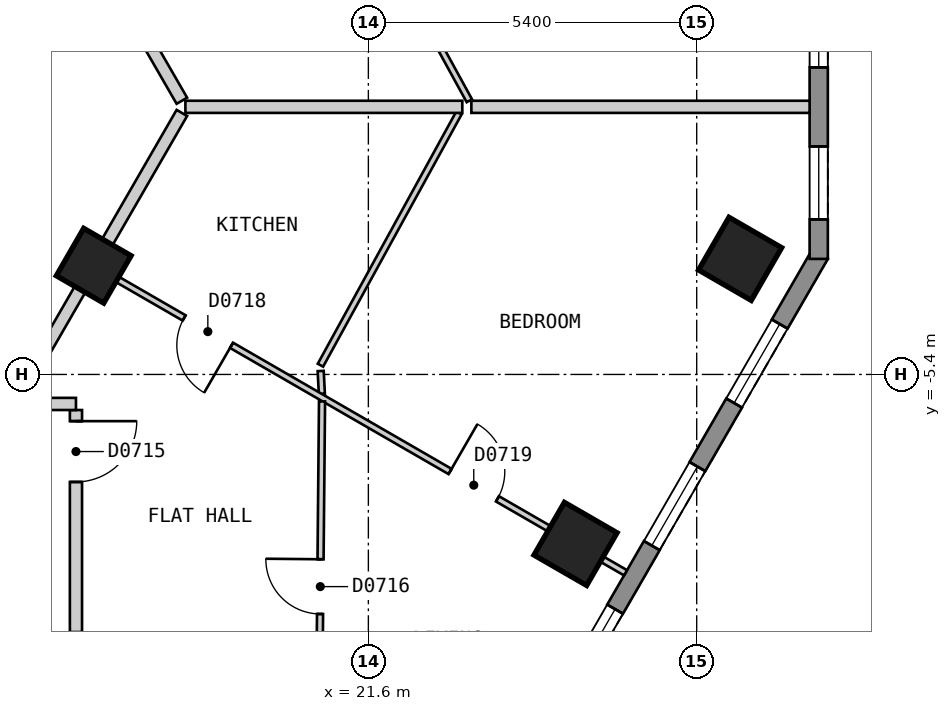
"""IFC4 building model, lengths in metres.
Left out: names, types, materials, properties, quantities, classifications, styles, units other than length and angle.
Written with IfcOpenShell. Run it as: python <this file> out.ifc"""

import sys

from ifc_helpers import new_model, si_unit, direction, frame, frame_2d, origin, origin_2d, place, context, subcontext, project, spatial, polyline, rectangle, outline, extrude, element, fill, save


model = new_model("IFC4")
c1 = context("Model", 3, precision=1e-05, world=origin(), true_north=direction((0.0, 1.0)))
c2 = subcontext(c1, "Body", "Model", "MODEL_VIEW")
j1 = project(units=[si_unit("LENGTHUNIT", "METRE"), si_unit("PLANEANGLEUNIT", "RADIAN")], contexts=[c1])
p1 = place(None, origin())
s1 = spatial("IfcSite", under=j1, at=p1, CompositionType="ELEMENT")
p2 = place(p1, origin())
s2 = spatial("IfcBuilding", under=s1, at=p2, CompositionType="ELEMENT")
p3 = place(p2, frame((0.0, 0.0, 105.0)))
s3 = spatial("IfcBuildingStorey", under=s2, at=p3, CompositionType="ELEMENT", Elevation=105.0)
for number, where, z_axis, x_axis in (
    (1, (25.007, -8.187, 0.0), (0.0, 0.0, 1.0), (0.5, 0.866, 0.0)),
    (2, (27.714, -3.499, 0.0), (0.0, 0.0, 1.0), (0.5, 0.866, 0.0)),
):
    element("IfcColumn", number, at=place(p3, frame(where, z_axis=z_axis, x_axis=x_axis)), inside=s3, PredefinedType="COLUMN", context=c2, shape_type="SweptSolid", body=[
        extrude(rectangle(XDim=1.0, YDim=1.0, at=origin_2d()), origin(), (0.0, 0.0, 1.0), 3.0),
    ])
p4 = place(p3, frame((17.083, -3.612, 0.0), z_axis=(0.0, 0.0, 1.0), x_axis=(0.5, 0.866025403784, 0.0)))
e3 = element("IfcColumn", 3, at=p4, inside=s3, PredefinedType="COLUMN", context=c2, shape_type="SweptSolid", body=[
    extrude(rectangle(XDim=0.9, YDim=0.9, at=origin_2d()), origin(), (0.0, 0.0, 1.0), 3.0),
])
p5 = place(p3, frame((17.479, -23.425, 0.0), z_axis=(0.0, 0.0, 1.0), x_axis=(0.500035407905, 0.866004960056, 0.0)))
e4 = element("IfcWall", 4, at=p5, inside=s3, PredefinedType="SOLIDWALL", context=c2, shape_type="SweptSolid", body=[
    extrude(outline(polyline([(0.0, -0.15), (23.094, -0.15), (23.014, 0.15), (0.08, 0.15), (0.0, -0.15)])), origin(), (0.0, 0.0, 1.0), 2.6),
])
p6 = place(p5, frame((1.324, 0.0, 0.15)))
e5 = element("IfcOpeningElement", 5, at=p6, cuts=e4, PredefinedType="OPENING", context=c2, shape_type="SweptSolid", body=[
    extrude(rectangle(XDim=1.5, YDim=2.1, at=frame_2d((0.75, 1.05))), frame((0.0, 0.16, 0.0), z_axis=(0.0, -1.0, 0.0), x_axis=(1.0, 0.0, 0.0)), (0.0, 0.0, 1.0), 0.32),
])
p7 = place(p5, frame((4.031, 0.0, 0.15)))
e6 = element("IfcOpeningElement", 6, at=p7, cuts=e4, PredefinedType="OPENING", context=c2, shape_type="SweptSolid", body=[
    extrude(rectangle(XDim=1.5, YDim=2.1, at=frame_2d((0.75, 1.05))), frame((0.0, 0.16, 0.0), z_axis=(0.0, -1.0, 0.0), x_axis=(1.0, 0.0, 0.0)), (0.0, 0.0, 1.0), 0.32),
])
p8 = place(p5, frame((6.737, 0.0, 0.15)))
e7 = element("IfcOpeningElement", 7, at=p8, cuts=e4, PredefinedType="OPENING", context=c2, shape_type="SweptSolid", body=[
    extrude(rectangle(XDim=1.5, YDim=2.1, at=frame_2d((0.75, 1.05))), frame((0.0, 0.16, 0.0), z_axis=(0.0, -1.0, 0.0), x_axis=(1.0, 0.0, 0.0)), (0.0, 0.0, 1.0), 0.32),
])
p9 = place(p5, frame((9.444, 0.0, 0.15)))
e8 = element("IfcOpeningElement", 8, at=p9, cuts=e4, PredefinedType="OPENING", context=c2, shape_type="SweptSolid", body=[
    extrude(rectangle(XDim=1.5, YDim=2.1, at=frame_2d((0.75, 1.05))), frame((0.0, 0.16, 0.0), z_axis=(0.0, -1.0, 0.0), x_axis=(1.0, 0.0, 0.0)), (0.0, 0.0, 1.0), 0.32),
])
p10 = place(p5, frame((12.151, 0.0, 0.15)))
e9 = element("IfcOpeningElement", 9, at=p10, cuts=e4, PredefinedType="OPENING", context=c2, shape_type="SweptSolid", body=[
    extrude(rectangle(XDim=1.5, YDim=2.1, at=frame_2d((0.75, 1.05))), frame((0.0, 0.16, 0.0), z_axis=(0.0, -1.0, 0.0), x_axis=(1.0, 0.0, 0.0)), (0.0, 0.0, 1.0), 0.32),
])
p11 = place(p5, frame((14.857, 0.0, 0.15)))
e10 = element("IfcOpeningElement", 10, at=p11, cuts=e4, PredefinedType="OPENING", context=c2, shape_type="SweptSolid", body=[
    extrude(rectangle(XDim=1.5, YDim=2.1, at=frame_2d((0.75, 1.05))), frame((0.0, 0.16, 0.0), z_axis=(0.0, -1.0, 0.0), x_axis=(1.0, 0.0, 0.0)), (0.0, 0.0, 1.0), 0.32),
])
p12 = place(p5, frame((17.564, 0.0, 0.15)))
e11 = element("IfcOpeningElement", 11, at=p12, cuts=e4, PredefinedType="OPENING", context=c2, shape_type="SweptSolid", body=[
    extrude(rectangle(XDim=1.5, YDim=2.1, at=frame_2d((0.75, 1.05))), frame((0.0, 0.16, 0.0), z_axis=(0.0, -1.0, 0.0), x_axis=(1.0, 0.0, 0.0)), (0.0, 0.0, 1.0), 0.32),
])
p13 = place(p5, frame((20.271, 0.0, 0.15)))
e12 = element("IfcOpeningElement", 12, at=p13, cuts=e4, PredefinedType="OPENING", context=c2, shape_type="SweptSolid", body=[
    extrude(rectangle(XDim=1.5, YDim=2.1, at=frame_2d((0.75, 1.05))), frame((0.0, 0.16, 0.0), z_axis=(0.0, -1.0, 0.0), x_axis=(1.0, 0.0, 0.0)), (0.0, 0.0, 1.0), 0.32),
])
p14 = place(p3, frame((29.007, -3.5, 0.0), z_axis=(0.0, 0.0, 1.0), x_axis=(0.0, 1.0, 0.0)))
e13 = element("IfcWall", 13, at=p14, inside=s3, PredefinedType="SOLIDWALL", context=c2, shape_type="SweptSolid", body=[
    extrude(outline(polyline([(0.0, -0.15), (5.0, -0.15), (4.92, 0.15), (0.08, 0.15), (0.0, -0.15)])), origin(), (0.0, 0.0, 1.0), 2.6),
])
p15 = place(p14, frame((0.65, 0.0, 0.15)))
e14 = element("IfcOpeningElement", 14, at=p15, cuts=e13, PredefinedType="OPENING", context=c2, shape_type="SweptSolid", body=[
    extrude(rectangle(XDim=1.2, YDim=2.1, at=frame_2d((0.6, 1.05))), frame((0.0, 0.16, 0.0), z_axis=(0.0, -1.0, 0.0), x_axis=(1.0, 0.0, 0.0)), (0.0, 0.0, 1.0), 0.32),
])
p16 = place(p14, frame((3.15, 0.0, 0.15)))
e15 = element("IfcOpeningElement", 15, at=p16, cuts=e13, PredefinedType="OPENING", context=c2, shape_type="SweptSolid", body=[
    extrude(rectangle(XDim=1.2, YDim=2.1, at=frame_2d((0.6, 1.05))), frame((0.0, 0.16, 0.0), z_axis=(0.0, -1.0, 0.0), x_axis=(1.0, 0.0, 0.0)), (0.0, 0.0, 1.0), 0.32),
])
p17 = place(p3, frame((8.488, 16.5, 0.0), z_axis=(0.0, 0.0, 1.0), x_axis=(0.499986836607, -0.86603300354, 0.0)))
e16 = element("IfcWall", 16, at=p17, inside=s3, PredefinedType="PARTITIONING", context=c2, shape_type="SweptSolid", body=[
    extrude(rectangle(XDim=20.09, YDim=0.2, at=frame_2d((10.045, 0.0))), origin(), (0.0, 0.0, 1.0), 2.6),
])
p18 = place(p17, frame((14.569, 0.0, 0.0)))
e17 = element("IfcOpeningElement", 17, at=p18, cuts=e16, PredefinedType="OPENING", context=c2, shape_type="SweptSolid", body=[
    extrude(rectangle(XDim=1.0, YDim=2.1, at=frame_2d((0.5, 1.05))), frame((0.0, 0.11, 0.0), z_axis=(0.0, -1.0, 0.0), x_axis=(1.0, 0.0, 0.0)), (0.0, 0.0, 1.0), 0.22),
])
p19 = place(p17, frame((4.547, 0.0, 0.0)))
e18 = element("IfcOpeningElement", 18, at=p19, cuts=e16, PredefinedType="OPENING", context=c2, shape_type="SweptSolid", body=[
    extrude(rectangle(XDim=1.0, YDim=2.1, at=frame_2d((0.5, 1.05))), frame((0.0, 0.11, 0.0), z_axis=(0.0, -1.0, 0.0), x_axis=(1.0, 0.0, 0.0)), (0.0, 0.0, 1.0), 0.22),
])
p20 = place(p3, frame((16.791, -5.985, 0.0), z_axis=(0.0, 0.0, 1.0), x_axis=(0.0, -1.0, 0.0)))
e19 = element("IfcWall", 19, at=p20, inside=s3, PredefinedType="PARTITIONING", context=c2, shape_type="SweptSolid", body=[
    extrude(rectangle(XDim=3.651, YDim=0.2, at=frame_2d((1.825, 0.0))), origin(), (0.0, 0.0, 1.0), 2.6),
])
p21 = place(p20, frame((0.183, 0.0, 0.0)))
e20 = element("IfcOpeningElement", 20, at=p21, cuts=e19, PredefinedType="OPENING", context=c2, shape_type="SweptSolid", body=[
    extrude(rectangle(XDim=1.0, YDim=2.1, at=frame_2d((0.5, 1.05))), frame((0.0, 0.11, 0.0), z_axis=(0.0, -1.0, 0.0), x_axis=(1.0, 0.0, 0.0)), (0.0, 0.0, 1.0), 0.22),
])
p22 = place(p3, frame((15.887, -5.885, 0.0), z_axis=(0.0, 0.0, 1.0), x_axis=(1.0, 0.0, 0.0)))
e21 = element("IfcWall", 21, at=p22, inside=s3, PredefinedType="PARTITIONING", context=c2, shape_type="SweptSolid", body=[
    extrude(rectangle(XDim=0.904, YDim=0.2, at=frame_2d((0.452, 0.0))), origin(), (0.0, 0.0, 1.0), 2.6),
])
p23 = place(p3, frame((15.771, -5.884, 0.0), z_axis=(0.0, 0.0, 1.0), x_axis=(0.499917542299, 0.866073005526, 0.0)))
e22 = element("IfcWall", 22, at=p23, inside=s3, PredefinedType="PARTITIONING", context=c2, shape_type="SweptSolid", body=[
    extrude(rectangle(XDim=5.525, YDim=0.2, at=frame_2d((2.762, 0.0))), origin(), (0.0, 0.0, 1.0), 2.6),
])
p24 = place(p3, frame((20.939, 3.331, 0.0), z_axis=(0.0, 0.0, 1.0), x_axis=(0.481207738216, -0.876606589458, 0.0)))
e23 = element("IfcWall", 23, at=p24, inside=s3, PredefinedType="PARTITIONING", context=c2, shape_type="SweptSolid", body=[
    extrude(rectangle(XDim=4.825, YDim=0.1, at=frame_2d((2.413, 0.0))), origin(), (0.0, 0.0, 1.0), 2.6),
])
p25 = place(p3, frame((20.816, -5.343, 0.0), z_axis=(0.0, 0.0, 1.0), x_axis=(0.05045379463, -0.99872639627, 0.0)))
e24 = element("IfcWall", 24, at=p25, inside=s3, PredefinedType="PARTITIONING", context=c2, shape_type="SweptSolid", body=[
    extrude(rectangle(XDim=0.377, YDim=0.1, at=frame_2d((0.189, 0.0))), origin(), (0.0, 0.0, 1.0), 2.6),
])
p26 = place(p3, frame((17.169, -3.662, 0.0), z_axis=(0.0, 0.0, 1.0), x_axis=(0.866047370643, -0.499961950354, 0.0)))
e25 = element("IfcWall", 25, at=p26, inside=s3, PredefinedType="PARTITIONING", context=c2, shape_type="SweptSolid", body=[
    extrude(rectangle(XDim=10.001, YDim=0.1, at=frame_2d((5.0, 0.0))), origin(), (0.0, 0.0, 1.0), 2.6),
])
p27 = place(p26, frame((1.618, 0.0, 0.0)))
e26 = element("IfcOpeningElement", 26, at=p27, cuts=e25, PredefinedType="OPENING", context=c2, shape_type="SweptSolid", body=[
    extrude(rectangle(XDim=0.9, YDim=2.1, at=frame_2d((0.45, 1.05))), frame((0.0, 0.06, 0.0), z_axis=(0.0, -1.0, 0.0), x_axis=(1.0, 0.0, 0.0)), (0.0, 0.0, 1.0), 0.12),
])
p28 = place(p26, frame((6.668, 0.0, 0.0)))
e27 = element("IfcOpeningElement", 27, at=p28, cuts=e25, PredefinedType="OPENING", context=c2, shape_type="SweptSolid", body=[
    extrude(rectangle(XDim=0.9, YDim=2.1, at=frame_2d((0.45, 1.05))), frame((0.0, 0.06, 0.0), z_axis=(0.0, -1.0, 0.0), x_axis=(1.0, 0.0, 0.0)), (0.0, 0.0, 1.0), 0.12),
])
p29 = place(p3, frame((20.812, -5.248, 0.0), z_axis=(0.0, 0.0, 1.0), x_axis=(0.481296891345, 0.876557643502, 0.0)))
e28 = element("IfcWall", 28, at=p29, inside=s3, PredefinedType="PARTITIONING", context=c2, shape_type="SweptSolid", body=[
    extrude(rectangle(XDim=4.733, YDim=0.1, at=frame_2d((2.367, 0.0))), origin(), (0.0, 0.0, 1.0), 2.6),
])
p30 = place(p3, frame((20.781, -11.94, 0.0), z_axis=(0.0, 0.0, 1.0), x_axis=(0.009329670416, 0.999956477678, 0.0)))
e29 = element("IfcWall", 29, at=p30, inside=s3, PredefinedType="PARTITIONING", context=c2, shape_type="SweptSolid", body=[
    extrude(rectangle(XDim=6.097, YDim=0.1, at=frame_2d((3.049, 0.0))), origin(), (0.0, 0.0, 1.0), 2.6),
])
p31 = place(p30, frame((2.601, 0.0, 0.0)))
e30 = element("IfcOpeningElement", 30, at=p31, cuts=e29, PredefinedType="OPENING", context=c2, shape_type="SweptSolid", body=[
    extrude(rectangle(XDim=0.9, YDim=2.1, at=frame_2d((0.45, 1.05))), frame((0.0, 0.06, 0.0), z_axis=(0.0, -1.0, 0.0), x_axis=(1.0, 0.0, 0.0)), (0.0, 0.0, 1.0), 0.12),
])
p32 = place(p3, frame((18.591, -0.999, 0.0), z_axis=(0.0, 0.0, 1.0), x_axis=(1.0, 0.0, 0.0)))
e31 = element("IfcWall", 31, at=p32, inside=s3, PredefinedType="PARTITIONING", context=c2, shape_type="SweptSolid", body=[
    extrude(rectangle(XDim=4.554, YDim=0.2, at=frame_2d((2.277, 0.0))), origin(), (0.0, 0.0, 1.0), 2.6),
])
p33 = place(p3, frame((23.294, -0.999, 0.0), z_axis=(0.0, 0.0, 1.0), x_axis=(1.0, 0.0, 0.0)))
e32 = element("IfcWall", 32, at=p33, inside=s3, PredefinedType="PARTITIONING", context=c2, shape_type="SweptSolid", body=[
    extrude(rectangle(XDim=5.563, YDim=0.2, at=frame_2d((2.781, 0.0))), origin(), (0.0, 0.0, 1.0), 2.6),
])
p34 = place(p11, origin())
e33 = element("IfcWindow", 33, at=p34, inside=s3, PartitioningType="SINGLE_PANEL", PredefinedType="WINDOW", context=c2, shape_type="SweptSolid", body=[
    extrude(rectangle(XDim=1.5, YDim=2.1, at=frame_2d((0.75, 1.05))), frame((0.0, 0.03, 0.0), z_axis=(0.0, -1.0, 0.0), x_axis=(1.0, 0.0, 0.0)), (0.0, 0.0, 1.0), 0.06),
])
fill(e10, e33)
p35 = place(p12, origin())
e34 = element("IfcWindow", 34, at=p35, inside=s3, PartitioningType="SINGLE_PANEL", PredefinedType="WINDOW", context=c2, shape_type="SweptSolid", body=[
    extrude(rectangle(XDim=1.5, YDim=2.1, at=frame_2d((0.75, 1.05))), frame((0.0, 0.03, 0.0), z_axis=(0.0, -1.0, 0.0), x_axis=(1.0, 0.0, 0.0)), (0.0, 0.0, 1.0), 0.06),
])
fill(e11, e34)
p36 = place(p13, origin())
e35 = element("IfcWindow", 35, at=p36, inside=s3, PartitioningType="SINGLE_PANEL", PredefinedType="WINDOW", context=c2, shape_type="SweptSolid", body=[
    extrude(rectangle(XDim=1.5, YDim=2.1, at=frame_2d((0.75, 1.05))), frame((0.0, 0.03, 0.0), z_axis=(0.0, -1.0, 0.0), x_axis=(1.0, 0.0, 0.0)), (0.0, 0.0, 1.0), 0.06),
])
fill(e12, e35)
p37 = place(p15, origin())
e36 = element("IfcWindow", 36, at=p37, inside=s3, PartitioningType="SINGLE_PANEL", PredefinedType="WINDOW", context=c2, shape_type="SweptSolid", body=[
    extrude(rectangle(XDim=1.2, YDim=2.1, at=frame_2d((0.6, 1.05))), frame((0.0, 0.03, 0.0), z_axis=(0.0, -1.0, 0.0), x_axis=(1.0, 0.0, 0.0)), (0.0, 0.0, 1.0), 0.06),
])
fill(e14, e36)
p38 = place(p16, origin())
e37 = element("IfcWindow", 37, at=p38, inside=s3, PartitioningType="SINGLE_PANEL", PredefinedType="WINDOW", context=c2, shape_type="SweptSolid", body=[
    extrude(rectangle(XDim=1.2, YDim=2.1, at=frame_2d((0.6, 1.05))), frame((0.0, 0.03, 0.0), z_axis=(0.0, -1.0, 0.0), x_axis=(1.0, 0.0, 0.0)), (0.0, 0.0, 1.0), 0.06),
])
fill(e15, e37)
p39 = place(p21, origin())
e38 = element("IfcDoor", 38, at=p39, inside=s3, OperationType="SINGLE_SWING_LEFT", PredefinedType="DOOR", context=c2, shape_type="SweptSolid", body=[
    extrude(rectangle(XDim=1.0, YDim=2.1, at=frame_2d((0.5, 1.05))), frame((0.0, 0.025, 0.0), z_axis=(0.0, -1.0, 0.0), x_axis=(1.0, 0.0, 0.0)), (0.0, 0.0, 1.0), 0.05),
])
fill(e20, e38)
p40 = place(p31, origin())
e39 = element("IfcDoor", 39, at=p40, inside=s3, OperationType="SINGLE_SWING_RIGHT", PredefinedType="DOOR", context=c2, shape_type="SweptSolid", body=[
    extrude(rectangle(XDim=0.9, YDim=2.1, at=frame_2d((0.45, 1.05))), frame((0.0, 0.025, 0.0), z_axis=(0.0, -1.0, 0.0), x_axis=(1.0, 0.0, 0.0)), (0.0, 0.0, 1.0), 0.05),
])
fill(e30, e39)
p41 = place(p27, origin())
e40 = element("IfcDoor", 40, at=p41, inside=s3, OperationType="SINGLE_SWING_RIGHT", PredefinedType="DOOR", context=c2, shape_type="SweptSolid", body=[
    extrude(rectangle(XDim=0.9, YDim=2.1, at=frame_2d((0.45, 1.05))), frame((0.0, 0.025, 0.0), z_axis=(0.0, -1.0, 0.0), x_axis=(1.0, 0.0, 0.0)), (0.0, 0.0, 1.0), 0.05),
])
fill(e26, e40)
p42 = place(p28, origin())
e41 = element("IfcDoor", 41, at=p42, inside=s3, OperationType="SINGLE_SWING_LEFT", PredefinedType="DOOR", context=c2, shape_type="SweptSolid", body=[
    extrude(rectangle(XDim=0.9, YDim=2.1, at=frame_2d((0.45, 1.05))), frame((0.0, 0.025, 0.0), z_axis=(0.0, -1.0, 0.0), x_axis=(1.0, 0.0, 0.0)), (0.0, 0.0, 1.0), 0.05),
])
fill(e27, e41)
save(model, sys.argv[1])
